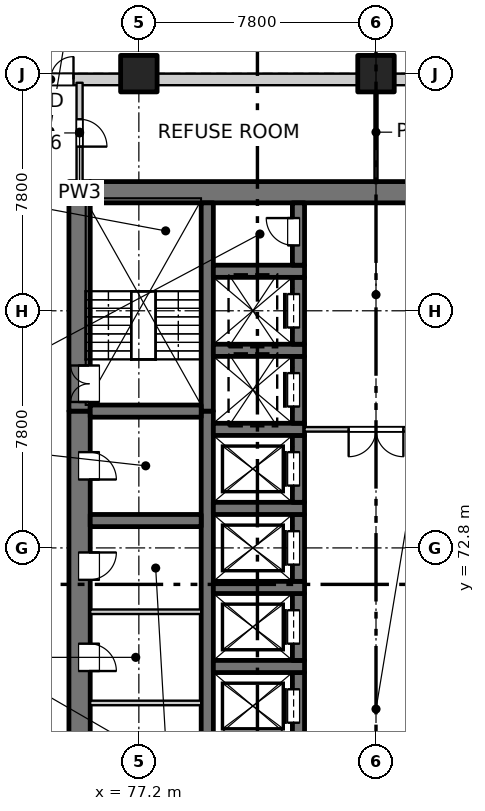
"""IFC4 building model, lengths in metres.
Left out: names, types, materials, properties, quantities, classifications, styles, units other than length and angle.
Written with IfcOpenShell. Run it as: python <this file> out.ifc"""

import sys

from ifc_helpers import new_model, si_unit, direction, frame, frame_2d, origin, origin_2d, place, context, subcontext, project, spatial, rectangle, extrude, element, fill, save


model = new_model("IFC4")
c1 = context("Model", 3, precision=1e-05, world=origin(), true_north=direction((0.0, 1.0)))
c2 = subcontext(c1, "Body", "Model", "MODEL_VIEW")
j1 = project(units=[si_unit("LENGTHUNIT", "METRE"), si_unit("PLANEANGLEUNIT", "RADIAN")], contexts=[c1])
p1 = place(None, origin())
s1 = spatial("IfcSite", under=j1, at=p1, CompositionType="ELEMENT")
p2 = place(p1, origin())
s2 = spatial("IfcBuilding", under=s1, at=p2, CompositionType="ELEMENT")
p3 = place(p2, origin())
s3 = spatial("IfcBuildingStorey", under=s2, at=p3, CompositionType="ELEMENT", Elevation=0.0)
for number, where, z_axis, x_axis in (
    (1, (77.2, 88.4, -0.4), (0.0, 0.0, 1.0), (1.0, 0.0, 0.0)),
    (2, (85.0, 88.4, -0.4), (0.0, 0.0, 1.0), (1.0, 0.0, 0.0)),
):
    element("IfcColumn", number, at=place(p3, frame(where, z_axis=z_axis, x_axis=x_axis)), inside=s3, PredefinedType="COLUMN", context=c2, shape_type="SweptSolid", body=[
        extrude(rectangle(XDim=1.2, YDim=1.2, at=origin_2d()), origin(), (0.0, 0.0, 1.0), 6.1),
    ])
p4 = place(p3, frame((75.25, 54.9, -0.4), z_axis=(0.0, 0.0, 1.0), x_axis=(0.0, 1.0, 0.0)))
e3 = element("IfcWall", 3, at=p4, inside=s3, PredefinedType="SOLIDWALL", context=c2, shape_type="SweptSolid", body=[
    extrude(rectangle(XDim=22.4, YDim=0.7, at=frame_2d((11.2, 0.0))), origin(), (0.0, 0.0, 1.0), 6.1),
])
p5 = place(p4, frame((7.55, 0.0, 0.4)))
e4 = element("IfcOpeningElement", 4, at=p5, cuts=e3, PredefinedType="OPENING", context=c2, shape_type="SweptSolid", body=[
    extrude(rectangle(XDim=0.9, YDim=2.1, at=frame_2d((0.45, 1.05))), frame((0.0, 0.36, 0.0), z_axis=(0.0, -1.0, 0.0), x_axis=(1.0, 0.0, 0.0)), (0.0, 0.0, 1.0), 0.72),
])
p6 = place(p4, frame((10.85, 0.0, 0.4)))
e5 = element("IfcOpeningElement", 5, at=p6, cuts=e3, PredefinedType="OPENING", context=c2, shape_type="SweptSolid", body=[
    extrude(rectangle(XDim=0.9, YDim=2.1, at=frame_2d((0.45, 1.05))), frame((0.0, 0.36, 0.0), z_axis=(0.0, -1.0, 0.0), x_axis=(1.0, 0.0, 0.0)), (0.0, 0.0, 1.0), 0.72),
])
p7 = place(p4, frame((13.85, 0.0, 0.4)))
e6 = element("IfcOpeningElement", 6, at=p7, cuts=e3, PredefinedType="OPENING", context=c2, shape_type="SweptSolid", body=[
    extrude(rectangle(XDim=0.9, YDim=2.1, at=frame_2d((0.45, 1.05))), frame((0.0, 0.36, 0.0), z_axis=(0.0, -1.0, 0.0), x_axis=(1.0, 0.0, 0.0)), (0.0, 0.0, 1.0), 0.72),
])
p8 = place(p4, frame((16.85, 0.0, 0.4)))
e7 = element("IfcOpeningElement", 7, at=p8, cuts=e3, PredefinedType="OPENING", context=c2, shape_type="SweptSolid", body=[
    extrude(rectangle(XDim=0.9, YDim=2.1, at=frame_2d((0.45, 1.05))), frame((0.0, 0.36, 0.0), z_axis=(0.0, -1.0, 0.0), x_axis=(1.0, 0.0, 0.0)), (0.0, 0.0, 1.0), 0.72),
])
p9 = place(p4, frame((20.15, 0.0, 0.4)))
e8 = element("IfcOpeningElement", 8, at=p9, cuts=e3, PredefinedType="OPENING", context=c2, shape_type="SweptSolid", body=[
    extrude(rectangle(XDim=0.9, YDim=2.1, at=frame_2d((0.45, 1.05))), frame((0.0, 0.36, 0.0), z_axis=(0.0, -1.0, 0.0), x_axis=(1.0, 0.0, 0.0)), (0.0, 0.0, 1.0), 0.72),
])
p10 = place(p3, frame((75.25, 77.3, -0.4), z_axis=(0.0, 0.0, 1.0), x_axis=(0.0, 1.0, 0.0)))
e9 = element("IfcWall", 9, at=p10, inside=s3, PredefinedType="SOLIDWALL", context=c2, shape_type="SweptSolid", body=[
    extrude(rectangle(XDim=7.55, YDim=0.7, at=frame_2d((3.775, 0.0))), origin(), (0.0, 0.0, 1.0), 6.1),
])
p11 = place(p10, frame((0.3, 0.0, 0.4)))
e10 = element("IfcOpeningElement", 10, at=p11, cuts=e9, PredefinedType="OPENING", context=c2, shape_type="SweptSolid", body=[
    extrude(rectangle(XDim=1.2, YDim=2.1, at=frame_2d((0.6, 1.05))), frame((0.0, 0.36, 0.0), z_axis=(0.0, -1.0, 0.0), x_axis=(1.0, 0.0, 0.0)), (0.0, 0.0, 1.0), 0.72),
])
p12 = place(p3, frame((75.6, 84.5, -0.4), z_axis=(0.0, 0.0, 1.0), x_axis=(1.0, 0.0, 0.0)))
e11 = element("IfcWall", 11, at=p12, inside=s3, PredefinedType="SOLIDWALL", context=c2, shape_type="SweptSolid", body=[
    extrude(rectangle(XDim=18.8, YDim=0.7, at=frame_2d((9.4, 0.0))), origin(), (0.0, 0.0, 1.0), 6.1),
])
p13 = place(p3, frame((79.45, 60.9, -0.4), z_axis=(0.0, 0.0, 1.0), x_axis=(0.0, 1.0, 0.0)))
e12 = element("IfcWall", 12, at=p13, inside=s3, PredefinedType="SOLIDWALL", context=c2, shape_type="SweptSolid", body=[
    extrude(rectangle(XDim=16.4, YDim=0.4, at=frame_2d((8.2, 0.0))), origin(), (0.0, 0.0, 1.0), 6.1),
])
p14 = place(p3, frame((79.45, 77.3, -0.4), z_axis=(0.0, 0.0, 1.0), x_axis=(0.0, 1.0, 0.0)))
e13 = element("IfcWall", 13, at=p14, inside=s3, PredefinedType="SOLIDWALL", context=c2, shape_type="SweptSolid", body=[
    extrude(rectangle(XDim=6.85, YDim=0.4, at=frame_2d((3.425, 0.0))), origin(), (0.0, 0.0, 1.0), 6.1),
])
p15 = place(p3, frame((82.45, 66.5, -0.4), z_axis=(0.0, 0.0, 1.0), x_axis=(0.0, 1.0, 0.0)))
e14 = element("IfcWall", 14, at=p15, inside=s3, PredefinedType="SOLIDWALL", context=c2, shape_type="SweptSolid", body=[
    extrude(rectangle(XDim=2.2, YDim=0.4, at=frame_2d((1.1, 0.0))), origin(), (0.0, 0.0, 1.0), 6.1),
])
p16 = place(p15, frame((0.55, 0.0, 0.4)))
e15 = element("IfcOpeningElement", 15, at=p16, cuts=e14, PredefinedType="OPENING", context=c2, shape_type="SweptSolid", body=[
    extrude(rectangle(XDim=1.1, YDim=2.1, at=frame_2d((0.55, 1.05))), frame((0.0, 0.21, 0.0), z_axis=(0.0, -1.0, 0.0), x_axis=(1.0, 0.0, 0.0)), (0.0, 0.0, 1.0), 0.42),
])
p17 = place(p3, frame((79.65, 68.9, -0.4), z_axis=(0.0, 0.0, 1.0), x_axis=(1.0, 0.0, 0.0)))
e16 = element("IfcWall", 16, at=p17, inside=s3, PredefinedType="SOLIDWALL", context=c2, shape_type="SweptSolid", body=[
    extrude(rectangle(XDim=3.0, YDim=0.4, at=frame_2d((1.5, 0.0))), origin(), (0.0, 0.0, 1.0), 6.1),
])
p18 = place(p3, frame((82.45, 69.1, -0.4), z_axis=(0.0, 0.0, 1.0), x_axis=(0.0, 1.0, 0.0)))
e17 = element("IfcWall", 17, at=p18, inside=s3, PredefinedType="SOLIDWALL", context=c2, shape_type="SweptSolid", body=[
    extrude(rectangle(XDim=2.2, YDim=0.4, at=frame_2d((1.1, 0.0))), origin(), (0.0, 0.0, 1.0), 6.1),
])
p19 = place(p18, frame((0.55, 0.0, 0.4)))
e18 = element("IfcOpeningElement", 18, at=p19, cuts=e17, PredefinedType="OPENING", context=c2, shape_type="SweptSolid", body=[
    extrude(rectangle(XDim=1.1, YDim=2.1, at=frame_2d((0.55, 1.05))), frame((0.0, 0.21, 0.0), z_axis=(0.0, -1.0, 0.0), x_axis=(1.0, 0.0, 0.0)), (0.0, 0.0, 1.0), 0.42),
])
p20 = place(p3, frame((79.65, 71.5, -0.4), z_axis=(0.0, 0.0, 1.0), x_axis=(1.0, 0.0, 0.0)))
e19 = element("IfcWall", 19, at=p20, inside=s3, PredefinedType="SOLIDWALL", context=c2, shape_type="SweptSolid", body=[
    extrude(rectangle(XDim=3.0, YDim=0.4, at=frame_2d((1.5, 0.0))), origin(), (0.0, 0.0, 1.0), 6.1),
])
p21 = place(p3, frame((82.45, 71.7, -0.4), z_axis=(0.0, 0.0, 1.0), x_axis=(0.0, 1.0, 0.0)))
e20 = element("IfcWall", 20, at=p21, inside=s3, PredefinedType="SOLIDWALL", context=c2, shape_type="SweptSolid", body=[
    extrude(rectangle(XDim=2.2, YDim=0.4, at=frame_2d((1.1, 0.0))), origin(), (0.0, 0.0, 1.0), 6.1),
])
p22 = place(p21, frame((0.55, 0.0, 0.4)))
e21 = element("IfcOpeningElement", 21, at=p22, cuts=e20, PredefinedType="OPENING", context=c2, shape_type="SweptSolid", body=[
    extrude(rectangle(XDim=1.1, YDim=2.1, at=frame_2d((0.55, 1.05))), frame((0.0, 0.21, 0.0), z_axis=(0.0, -1.0, 0.0), x_axis=(1.0, 0.0, 0.0)), (0.0, 0.0, 1.0), 0.42),
])
p23 = place(p3, frame((79.65, 74.1, -0.4), z_axis=(0.0, 0.0, 1.0), x_axis=(1.0, 0.0, 0.0)))
e22 = element("IfcWall", 22, at=p23, inside=s3, PredefinedType="SOLIDWALL", context=c2, shape_type="SweptSolid", body=[
    extrude(rectangle(XDim=3.0, YDim=0.4, at=frame_2d((1.5, 0.0))), origin(), (0.0, 0.0, 1.0), 6.1),
])
p24 = place(p3, frame((82.45, 74.3, -0.4), z_axis=(0.0, 0.0, 1.0), x_axis=(0.0, 1.0, 0.0)))
e23 = element("IfcWall", 23, at=p24, inside=s3, PredefinedType="SOLIDWALL", context=c2, shape_type="SweptSolid", body=[
    extrude(rectangle(XDim=2.2, YDim=0.4, at=frame_2d((1.1, 0.0))), origin(), (0.0, 0.0, 1.0), 6.1),
])
p25 = place(p24, frame((0.55, 0.0, 0.4)))
e24 = element("IfcOpeningElement", 24, at=p25, cuts=e23, PredefinedType="OPENING", context=c2, shape_type="SweptSolid", body=[
    extrude(rectangle(XDim=1.1, YDim=2.1, at=frame_2d((0.55, 1.05))), frame((0.0, 0.21, 0.0), z_axis=(0.0, -1.0, 0.0), x_axis=(1.0, 0.0, 0.0)), (0.0, 0.0, 1.0), 0.42),
])
p26 = place(p3, frame((79.65, 76.7, -0.4), z_axis=(0.0, 0.0, 1.0), x_axis=(1.0, 0.0, 0.0)))
e25 = element("IfcWall", 25, at=p26, inside=s3, PredefinedType="SOLIDWALL", context=c2, shape_type="SweptSolid", body=[
    extrude(rectangle(XDim=3.0, YDim=0.4, at=frame_2d((1.5, 0.0))), origin(), (0.0, 0.0, 1.0), 6.1),
])
p27 = place(p3, frame((82.45, 76.9, -0.4), z_axis=(0.0, 0.0, 1.0), x_axis=(0.0, 1.0, 0.0)))
e26 = element("IfcWall", 26, at=p27, inside=s3, PredefinedType="SOLIDWALL", context=c2, shape_type="SweptSolid", body=[
    extrude(rectangle(XDim=2.2, YDim=0.4, at=frame_2d((1.1, 0.0))), origin(), (0.0, 0.0, 1.0), 6.1),
])
p28 = place(p27, frame((0.55, 0.0, 0.4)))
e27 = element("IfcOpeningElement", 27, at=p28, cuts=e26, PredefinedType="OPENING", context=c2, shape_type="SweptSolid", body=[
    extrude(rectangle(XDim=1.1, YDim=2.1, at=frame_2d((0.55, 1.05))), frame((0.0, 0.21, 0.0), z_axis=(0.0, -1.0, 0.0), x_axis=(1.0, 0.0, 0.0)), (0.0, 0.0, 1.0), 0.42),
])
p29 = place(p3, frame((79.65, 79.3, -0.4), z_axis=(0.0, 0.0, 1.0), x_axis=(1.0, 0.0, 0.0)))
e28 = element("IfcWall", 28, at=p29, inside=s3, PredefinedType="SOLIDWALL", context=c2, shape_type="SweptSolid", body=[
    extrude(rectangle(XDim=3.0, YDim=0.4, at=frame_2d((1.5, 0.0))), origin(), (0.0, 0.0, 1.0), 6.1),
])
p30 = place(p3, frame((82.45, 79.5, -0.4), z_axis=(0.0, 0.0, 1.0), x_axis=(0.0, 1.0, 0.0)))
e29 = element("IfcWall", 29, at=p30, inside=s3, PredefinedType="SOLIDWALL", context=c2, shape_type="SweptSolid", body=[
    extrude(rectangle(XDim=2.2, YDim=0.4, at=frame_2d((1.1, 0.0))), origin(), (0.0, 0.0, 1.0), 6.1),
])
p31 = place(p30, frame((0.55, 0.0, 0.4)))
e30 = element("IfcOpeningElement", 30, at=p31, cuts=e29, PredefinedType="OPENING", context=c2, shape_type="SweptSolid", body=[
    extrude(rectangle(XDim=1.1, YDim=2.1, at=frame_2d((0.55, 1.05))), frame((0.0, 0.21, 0.0), z_axis=(0.0, -1.0, 0.0), x_axis=(1.0, 0.0, 0.0)), (0.0, 0.0, 1.0), 0.42),
])
p32 = place(p3, frame((79.65, 81.9, -0.4), z_axis=(0.0, 0.0, 1.0), x_axis=(1.0, 0.0, 0.0)))
e31 = element("IfcWall", 31, at=p32, inside=s3, PredefinedType="SOLIDWALL", context=c2, shape_type="SweptSolid", body=[
    extrude(rectangle(XDim=3.0, YDim=0.4, at=frame_2d((1.5, 0.0))), origin(), (0.0, 0.0, 1.0), 6.1),
])
p33 = place(p3, frame((82.45, 82.1, -0.4), z_axis=(0.0, 0.0, 1.0), x_axis=(0.0, 1.0, 0.0)))
e32 = element("IfcWall", 32, at=p33, inside=s3, PredefinedType="SOLIDWALL", context=c2, shape_type="SweptSolid", body=[
    extrude(rectangle(XDim=2.05, YDim=0.4, at=frame_2d((1.025, 0.0))), origin(), (0.0, 0.0, 1.0), 6.1),
])
p34 = place(p33, frame((0.65, 0.0, 0.4)))
e33 = element("IfcOpeningElement", 33, at=p34, cuts=e32, PredefinedType="OPENING", context=c2, shape_type="SweptSolid", body=[
    extrude(rectangle(XDim=0.9, YDim=2.1, at=frame_2d((0.45, 1.05))), frame((0.0, 0.21, 0.0), z_axis=(0.0, -1.0, 0.0), x_axis=(1.0, 0.0, 0.0)), (0.0, 0.0, 1.0), 0.42),
])
for number, where, z_axis, x_axis in (
    (34, (75.6, 73.7, -0.4), (0.0, 0.0, 1.0), (1.0, 0.0, 0.0)),
    (35, (75.6, 77.3, -0.4), (0.0, 0.0, 1.0), (1.0, 0.0, 0.0)),
):
    element("IfcWall", number, at=place(p3, frame(where, z_axis=z_axis, x_axis=x_axis)), inside=s3, PredefinedType="SOLIDWALL", context=c2, shape_type="SweptSolid", body=[
        extrude(rectangle(XDim=3.65, YDim=0.4, at=frame_2d((1.825, 0.0))), origin(), (0.0, 0.0, 1.0), 6.1),
    ])
p35 = place(p3, frame((70.0, 88.21, 0.0), z_axis=(0.0, 0.0, 1.0), x_axis=(1.0, 0.0, 0.0)))
e36 = element("IfcWall", 36, at=p35, inside=s3, PredefinedType="SOLIDWALL", context=c2, shape_type="SweptSolid", body=[
    extrude(rectangle(XDim=6.6, YDim=0.38, at=frame_2d((3.3, 0.0))), origin(), (0.0, 0.0, 1.0), 5.7),
])
p36 = place(p35, frame((3.55, 0.0, 0.0)))
e37 = element("IfcOpeningElement", 37, at=p36, cuts=e36, PredefinedType="OPENING", context=c2, shape_type="SweptSolid", body=[
    extrude(rectangle(XDim=1.5, YDim=2.4, at=frame_2d((0.75, 1.2))), frame((0.0, 0.2, 0.0), z_axis=(0.0, -1.0, 0.0), x_axis=(1.0, 0.0, 0.0)), (0.0, 0.0, 1.0), 0.4),
])
p37 = place(p3, frame((77.8, 88.21, 0.0), z_axis=(0.0, 0.0, 1.0), x_axis=(1.0, 0.0, 0.0)))
e38 = element("IfcWall", 38, at=p37, inside=s3, PredefinedType="SOLIDWALL", context=c2, shape_type="SweptSolid", body=[
    extrude(rectangle(XDim=6.6, YDim=0.38, at=frame_2d((3.3, 0.0))), origin(), (0.0, 0.0, 1.0), 5.7),
])
p38 = place(p3, frame((85.6, 88.21, 0.0), z_axis=(0.0, 0.0, 1.0), x_axis=(1.0, 0.0, 0.0)))
e39 = element("IfcWall", 39, at=p38, inside=s3, PredefinedType="SOLIDWALL", context=c2, shape_type="SweptSolid", body=[
    extrude(rectangle(XDim=6.6, YDim=0.38, at=frame_2d((3.3, 0.0))), origin(), (0.0, 0.0, 1.0), 5.7),
])
p39 = place(p38, frame((3.1, 0.0, 0.0)))
e40 = element("IfcOpeningElement", 40, at=p39, cuts=e39, PredefinedType="OPENING", context=c2, shape_type="SweptSolid", body=[
    extrude(rectangle(XDim=2.4, YDim=2.7, at=frame_2d((1.2, 1.35))), frame((0.0, 0.2, 0.0), z_axis=(0.0, -1.0, 0.0), x_axis=(1.0, 0.0, 0.0)), (0.0, 0.0, 1.0), 0.4),
])
for number, where, z_axis, x_axis in (
    (41, (75.6, 67.7, 0.0), (0.0, 0.0, 1.0), (1.0, 0.0, 0.0)),
    (42, (75.6, 70.7, 0.0), (0.0, 0.0, 1.0), (1.0, 0.0, 0.0)),
):
    element("IfcWall", number, at=place(p3, frame(where, z_axis=z_axis, x_axis=x_axis)), inside=s3, PredefinedType="PARTITIONING", context=c2, shape_type="SweptSolid", body=[
        extrude(rectangle(XDim=3.65, YDim=0.15, at=frame_2d((1.825, 0.0))), origin(), (0.0, 0.0, 1.0), 5.7),
    ])
p40 = place(p3, frame((82.65, 76.7, 0.0), z_axis=(0.0, 0.0, 1.0), x_axis=(1.0, 0.0, 0.0)))
e43 = element("IfcWall", 43, at=p40, inside=s3, PredefinedType="PARTITIONING", context=c2, shape_type="SweptSolid", body=[
    extrude(rectangle(XDim=4.7, YDim=0.15, at=frame_2d((2.35, 0.0))), origin(), (0.0, 0.0, 1.0), 5.7),
])
p41 = place(p40, frame((1.45, 0.0, 0.0)))
e44 = element("IfcOpeningElement", 44, at=p41, cuts=e43, PredefinedType="OPENING", context=c2, shape_type="SweptSolid", body=[
    extrude(rectangle(XDim=1.8, YDim=2.1, at=frame_2d((0.9, 1.05))), frame((0.0, 0.085, 0.0), z_axis=(0.0, -1.0, 0.0), x_axis=(1.0, 0.0, 0.0)), (0.0, 0.0, 1.0), 0.17),
])
p42 = place(p3, frame((75.25, 84.85, 0.0), z_axis=(0.0, 0.0, 1.0), x_axis=(0.0, 1.0, 0.0)))
e45 = element("IfcWall", 45, at=p42, inside=s3, PredefinedType="PARTITIONING", context=c2, shape_type="SweptSolid", body=[
    extrude(rectangle(XDim=3.25, YDim=0.2, at=frame_2d((1.625, 0.0))), origin(), (0.0, 0.0, 1.0), 5.7),
])
p43 = place(p42, frame((1.15, 0.0, 0.0)))
e46 = element("IfcOpeningElement", 46, at=p43, cuts=e45, PredefinedType="OPENING", context=c2, shape_type="SweptSolid", body=[
    extrude(rectangle(XDim=0.9, YDim=2.1, at=frame_2d((0.45, 1.05))), frame((0.0, 0.11, 0.0), z_axis=(0.0, -1.0, 0.0), x_axis=(1.0, 0.0, 0.0)), (0.0, 0.0, 1.0), 0.22),
])
p44 = place(p3, frame((85.0, 84.85, 0.0), z_axis=(0.0, 0.0, 1.0), x_axis=(0.0, 1.0, 0.0)))
e47 = element("IfcWall", 47, at=p44, inside=s3, PredefinedType="PARTITIONING", context=c2, shape_type="SweptSolid", body=[
    extrude(rectangle(XDim=3.25, YDim=0.1, at=frame_2d((1.625, 0.0))), origin(), (0.0, 0.0, 1.0), 5.7),
])
p45 = place(p36, origin())
e48 = element("IfcDoor", 48, at=p45, inside=s3, OperationType="DOUBLE_DOOR_SINGLE_SWING", PredefinedType="DOOR", context=c2, shape_type="SweptSolid", body=[
    extrude(rectangle(XDim=1.5, YDim=2.4, at=frame_2d((0.75, 1.2))), frame((0.0, 0.025, 0.0), z_axis=(0.0, -1.0, 0.0), x_axis=(1.0, 0.0, 0.0)), (0.0, 0.0, 1.0), 0.05),
])
fill(e37, e48)
p46 = place(p16, origin())
e49 = element("IfcDoor", 49, at=p46, inside=s3, OperationType="SLIDING_TO_RIGHT", PredefinedType="DOOR", context=c2, shape_type="SweptSolid", body=[
    extrude(rectangle(XDim=1.1, YDim=2.1, at=frame_2d((0.55, 1.05))), frame((0.0, 0.185, 0.0), z_axis=(0.0, -1.0, 0.0), x_axis=(1.0, 0.0, 0.0)), (0.0, 0.0, 1.0), 0.05),
])
fill(e15, e49)
p47 = place(p7, origin())
e50 = element("IfcDoor", 50, at=p47, inside=s3, OperationType="SINGLE_SWING_RIGHT", PredefinedType="DOOR", context=c2, shape_type="SweptSolid", body=[
    extrude(rectangle(XDim=0.9, YDim=2.1, at=frame_2d((0.45, 1.05))), frame((0.0, -0.285, 0.0), z_axis=(0.0, -1.0, 0.0), x_axis=(1.0, 0.0, 0.0)), (0.0, 0.0, 1.0), 0.05),
])
fill(e6, e50)
p48 = place(p19, origin())
e51 = element("IfcDoor", 51, at=p48, inside=s3, OperationType="SLIDING_TO_LEFT", PredefinedType="DOOR", context=c2, shape_type="SweptSolid", body=[
    extrude(rectangle(XDim=1.1, YDim=2.1, at=frame_2d((0.55, 1.05))), frame((0.0, 0.185, 0.0), z_axis=(0.0, -1.0, 0.0), x_axis=(1.0, 0.0, 0.0)), (0.0, 0.0, 1.0), 0.05),
])
fill(e18, e51)
p49 = place(p8, origin())
e52 = element("IfcDoor", 52, at=p49, inside=s3, OperationType="SINGLE_SWING_LEFT", PredefinedType="DOOR", context=c2, shape_type="SweptSolid", body=[
    extrude(rectangle(XDim=0.9, YDim=2.1, at=frame_2d((0.45, 1.05))), frame((0.0, -0.285, 0.0), z_axis=(0.0, -1.0, 0.0), x_axis=(1.0, 0.0, 0.0)), (0.0, 0.0, 1.0), 0.05),
])
fill(e7, e52)
p50 = place(p22, origin())
e53 = element("IfcDoor", 53, at=p50, inside=s3, OperationType="SLIDING_TO_LEFT", PredefinedType="DOOR", context=c2, shape_type="SweptSolid", body=[
    extrude(rectangle(XDim=1.1, YDim=2.1, at=frame_2d((0.55, 1.05))), frame((0.0, 0.185, 0.0), z_axis=(0.0, -1.0, 0.0), x_axis=(1.0, 0.0, 0.0)), (0.0, 0.0, 1.0), 0.05),
])
fill(e21, e53)
p51 = place(p25, origin())
e54 = element("IfcDoor", 54, at=p51, inside=s3, OperationType="SLIDING_TO_LEFT", PredefinedType="DOOR", context=c2, shape_type="SweptSolid", body=[
    extrude(rectangle(XDim=1.1, YDim=2.1, at=frame_2d((0.55, 1.05))), frame((0.0, 0.185, 0.0), z_axis=(0.0, -1.0, 0.0), x_axis=(1.0, 0.0, 0.0)), (0.0, 0.0, 1.0), 0.05),
])
fill(e24, e54)
p52 = place(p9, origin())
e55 = element("IfcDoor", 55, at=p52, inside=s3, OperationType="SINGLE_SWING_RIGHT", PredefinedType="DOOR", context=c2, shape_type="SweptSolid", body=[
    extrude(rectangle(XDim=0.9, YDim=2.1, at=frame_2d((0.45, 1.05))), frame((0.0, -0.285, 0.0), z_axis=(0.0, -1.0, 0.0), x_axis=(1.0, 0.0, 0.0)), (0.0, 0.0, 1.0), 0.05),
])
fill(e8, e55)
p53 = place(p41, origin())
e56 = element("IfcDoor", 56, at=p53, inside=s3, OperationType="DOUBLE_DOOR_SINGLE_SWING", PredefinedType="DOOR", context=c2, shape_type="SweptSolid", body=[
    extrude(rectangle(XDim=1.8, YDim=2.1, at=frame_2d((0.9, 1.05))), frame((0.0, 0.025, 0.0), z_axis=(0.0, -1.0, 0.0), x_axis=(1.0, 0.0, 0.0)), (0.0, 0.0, 1.0), 0.05),
])
fill(e44, e56)
p54 = place(p28, origin())
e57 = element("IfcDoor", 57, at=p54, inside=s3, OperationType="SLIDING_TO_LEFT", PredefinedType="DOOR", context=c2, shape_type="SweptSolid", body=[
    extrude(rectangle(XDim=1.1, YDim=2.1, at=frame_2d((0.55, 1.05))), frame((0.0, 0.185, 0.0), z_axis=(0.0, -1.0, 0.0), x_axis=(1.0, 0.0, 0.0)), (0.0, 0.0, 1.0), 0.05),
])
fill(e27, e57)
p55 = place(p11, origin())
e58 = element("IfcDoor", 58, at=p55, inside=s3, OperationType="DOUBLE_DOOR_SINGLE_SWING", PredefinedType="DOOR", context=c2, shape_type="SweptSolid", body=[
    extrude(rectangle(XDim=1.2, YDim=2.1, at=frame_2d((0.6, 1.05))), frame((0.0, -0.285, 0.0), z_axis=(0.0, -1.0, 0.0), x_axis=(1.0, 0.0, 0.0)), (0.0, 0.0, 1.0), 0.05),
])
fill(e10, e58)
p56 = place(p31, origin())
e59 = element("IfcDoor", 59, at=p56, inside=s3, OperationType="SLIDING_TO_LEFT", PredefinedType="DOOR", context=c2, shape_type="SweptSolid", body=[
    extrude(rectangle(XDim=1.1, YDim=2.1, at=frame_2d((0.55, 1.05))), frame((0.0, 0.185, 0.0), z_axis=(0.0, -1.0, 0.0), x_axis=(1.0, 0.0, 0.0)), (0.0, 0.0, 1.0), 0.05),
])
fill(e30, e59)
p57 = place(p34, origin())
e60 = element("IfcDoor", 60, at=p57, inside=s3, OperationType="SINGLE_SWING_RIGHT", PredefinedType="DOOR", context=c2, shape_type="SweptSolid", body=[
    extrude(rectangle(XDim=0.9, YDim=2.1, at=frame_2d((0.45, 1.05))), frame((0.0, 0.185, 0.0), z_axis=(0.0, -1.0, 0.0), x_axis=(1.0, 0.0, 0.0)), (0.0, 0.0, 1.0), 0.05),
])
fill(e33, e60)
p58 = place(p43, origin())
e61 = element("IfcDoor", 61, at=p58, inside=s3, OperationType="SINGLE_SWING_RIGHT", PredefinedType="DOOR", context=c2, shape_type="SweptSolid", body=[
    extrude(rectangle(XDim=0.9, YDim=2.1, at=frame_2d((0.45, 1.05))), frame((0.0, 0.025, 0.0), z_axis=(0.0, -1.0, 0.0), x_axis=(1.0, 0.0, 0.0)), (0.0, 0.0, 1.0), 0.05),
])
fill(e46, e61)
save(model, sys.argv[1])
